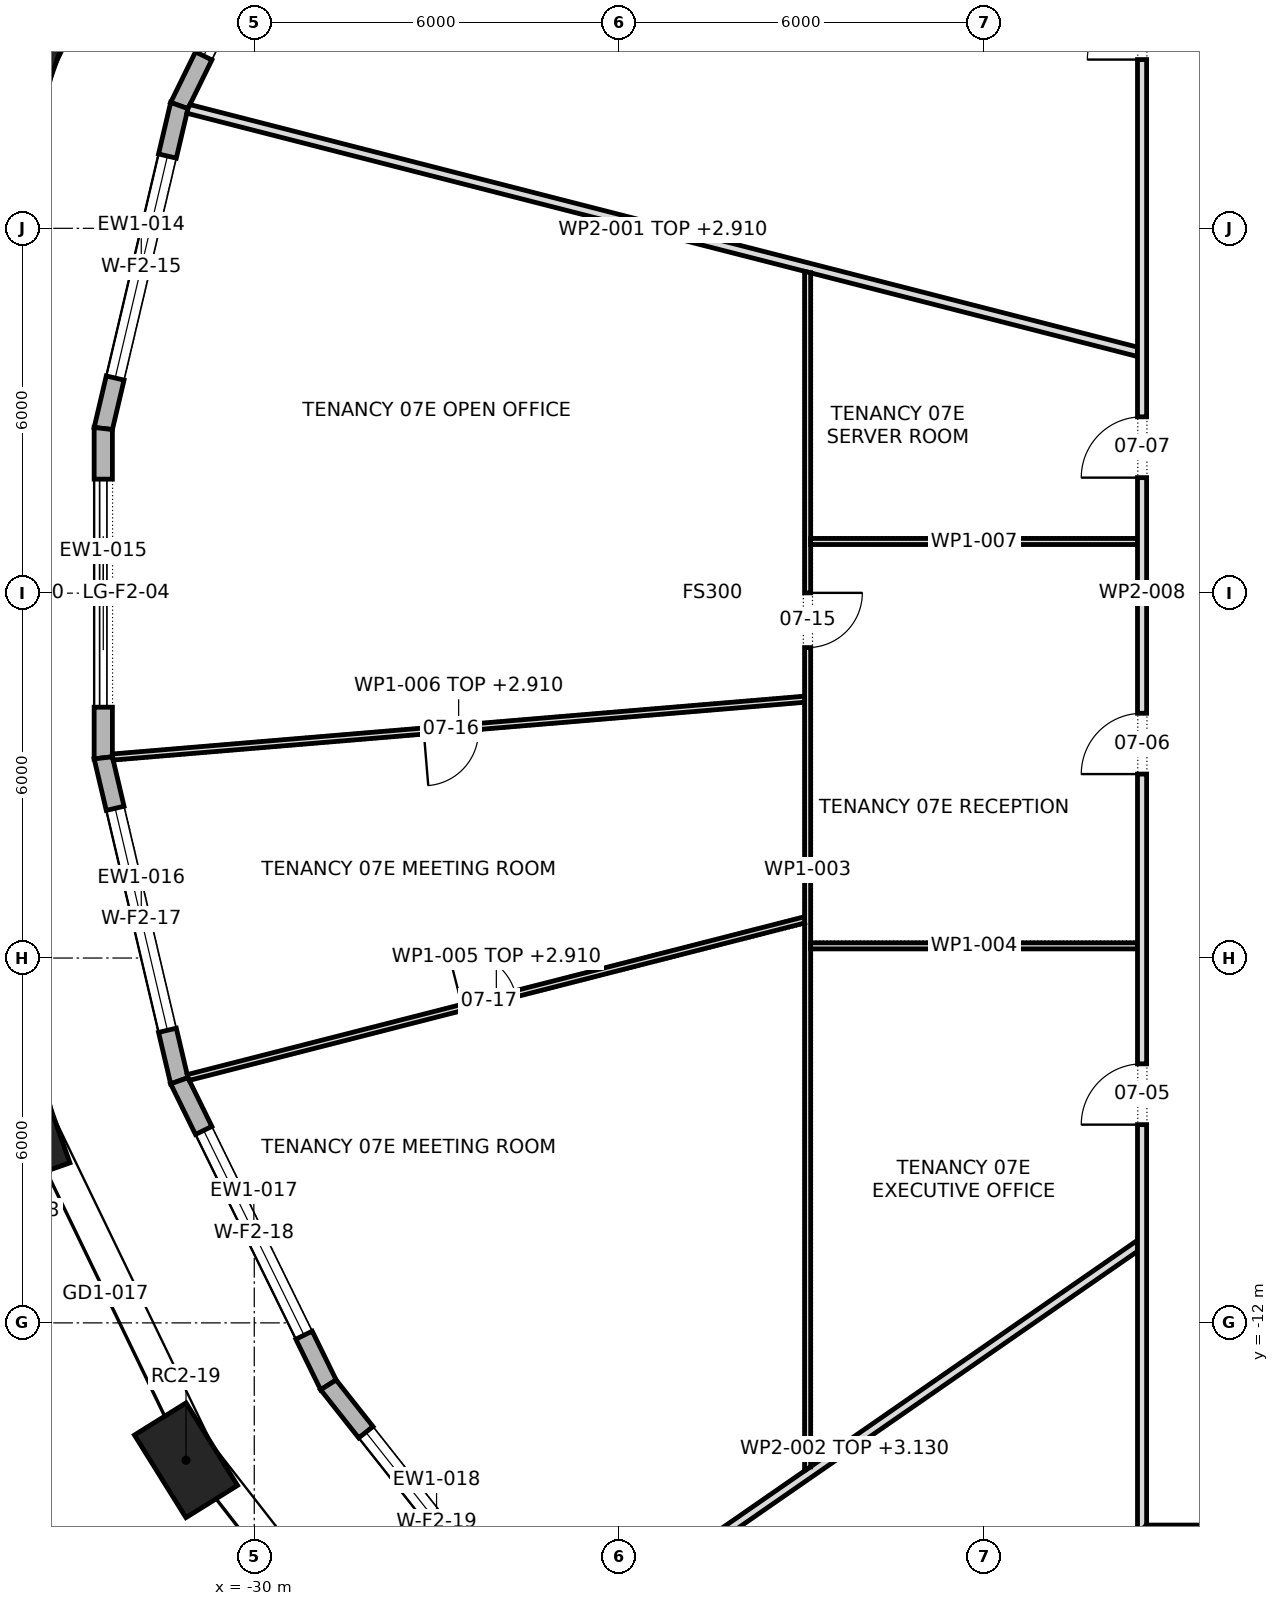
"""IFC4 building model, lengths in metres.
Left out: names, types, materials, properties, quantities, classifications, styles, units other than length and angle.
Written with IfcOpenShell. Run it as: python <this file> out.ifc"""

import sys

from ifc_helpers import new_model, si_unit, direction, frame, frame_2d, origin, origin_2d, place, context, subcontext, project, spatial, polyline, rectangle, outline, extrude, element, fill, save


model = new_model("IFC4")
c1 = context("Model", 3, precision=1e-05, world=origin(), true_north=direction((0.0, 1.0)))
c2 = subcontext(c1, "Body", "Model", "MODEL_VIEW")
j1 = project(units=[si_unit("LENGTHUNIT", "METRE"), si_unit("PLANEANGLEUNIT", "RADIAN")], contexts=[c1])
p1 = place(None, origin())
s1 = spatial("IfcSite", under=j1, at=p1, CompositionType="ELEMENT")
p2 = place(p1, origin())
s2 = spatial("IfcBuilding", under=s1, at=p2, CompositionType="ELEMENT")
p3 = place(p2, frame((0.0, 0.0, 104.5)))
s3 = spatial("IfcBuildingStorey", under=s2, at=p3, CompositionType="ELEMENT", Elevation=104.5)
for number, where, z_axis, x_axis in (
    (1, (-33.77, 8.781, 0.0), (0.0, 0.0, 1.0), (-0.334, -0.943, 0.0)),
    (2, (-33.77, -8.781, 0.0), (0.0, 0.0, 1.0), (0.334, -0.943, 0.0)),
    (3, (-31.123, -14.259, 0.0), (0.0, 0.0, 1.0), (0.529, -0.849, 0.0)),
):
    element("IfcColumn", number, at=place(p3, frame(where, z_axis=z_axis, x_axis=x_axis)), inside=s3, PredefinedType="COLUMN", context=c2, shape_type="SweptSolid", body=[
        extrude(rectangle(XDim=1.6, YDim=1.0, at=origin_2d()), origin(), (0.0, 0.0, 1.0), 4.2),
    ])
p4 = place(p3, frame((-28.781, 13.019, 0.0), z_axis=(0.0, 0.0, 1.0), x_axis=(-0.440238988749, -0.897880633929, 0.0)))
e4 = element("IfcWall", 4, at=p4, inside=s3, PredefinedType="STANDARD", context=c2, shape_type="SweptSolid", body=[
    extrude(outline(polyline([(-0.016, -0.15), (5.586, -0.15), (5.553, 0.15), (0.016, 0.15), (-0.016, -0.15)])), origin(), (0.0, 0.0, 1.0), 3.9),
])
p5 = place(p4, frame((0.91, 0.0, 0.6)))
e5 = element("IfcOpeningElement", 5, at=p5, cuts=e4, PredefinedType="OPENING", context=c2, shape_type="SweptSolid", body=[
    extrude(rectangle(XDim=3.75, YDim=2.85, at=frame_2d((1.875, 1.425))), frame((0.0, 0.162, 0.0), z_axis=(0.0, -1.0, 0.0), x_axis=(1.0, 0.0, 0.0)), (0.0, 0.0, 1.0), 0.324),
])
p6 = place(p3, frame((-31.233, 8.019, 0.0), z_axis=(0.0, 0.0, 1.0), x_axis=(-0.229193964616, -0.973380771632, 0.0)))
e6 = element("IfcWall", 6, at=p6, inside=s3, PredefinedType="STANDARD", context=c2, shape_type="SweptSolid", body=[
    extrude(outline(polyline([(-0.017, -0.15), (5.473, -0.15), (5.439, 0.15), (0.017, 0.15), (-0.017, -0.15)])), origin(), (0.0, 0.0, 1.0), 3.9),
])
p7 = place(p6, frame((0.853, 0.0, 0.6)))
e7 = element("IfcOpeningElement", 7, at=p7, cuts=e6, PredefinedType="OPENING", context=c2, shape_type="SweptSolid", body=[
    extrude(rectangle(XDim=3.75, YDim=2.85, at=frame_2d((1.875, 1.425))), frame((0.0, 0.162, 0.0), z_axis=(0.0, -1.0, 0.0), x_axis=(1.0, 0.0, 0.0)), (0.0, 0.0, 1.0), 0.324),
])
p8 = place(p3, frame((-32.483, 2.708, 0.0), z_axis=(0.0, 0.0, 1.0), x_axis=(0.0, -1.0, 0.0)))
e8 = element("IfcWall", 8, at=p8, inside=s3, PredefinedType="STANDARD", context=c2, shape_type="SweptSolid", body=[
    extrude(outline(polyline([(-0.017, -0.15), (5.433, -0.15), (5.398, 0.15), (0.017, 0.15), (-0.017, -0.15)])), origin(), (0.0, 0.0, 1.0), 3.9),
])
p9 = place(p8, frame((0.833, 0.0, 0.0)))
e9 = element("IfcOpeningElement", 9, at=p9, cuts=e8, PredefinedType="OPENING", context=c2, shape_type="SweptSolid", body=[
    extrude(rectangle(XDim=3.75, YDim=3.45, at=frame_2d((1.875, 1.725))), frame((0.0, 0.162, 0.0), z_axis=(0.0, -1.0, 0.0), x_axis=(1.0, 0.0, 0.0)), (0.0, 0.0, 1.0), 0.324),
])
p10 = place(p3, frame((-32.483, -2.708, 0.0), z_axis=(0.0, 0.0, 1.0), x_axis=(0.229193964616, -0.973380771632, 0.0)))
e10 = element("IfcWall", 10, at=p10, inside=s3, PredefinedType="STANDARD", context=c2, shape_type="SweptSolid", body=[
    extrude(outline(polyline([(-0.017, -0.15), (5.473, -0.15), (5.439, 0.15), (0.017, 0.15), (-0.017, -0.15)])), origin(), (0.0, 0.0, 1.0), 3.9),
])
p11 = place(p10, frame((0.853, 0.0, 0.6)))
e11 = element("IfcOpeningElement", 11, at=p11, cuts=e10, PredefinedType="OPENING", context=c2, shape_type="SweptSolid", body=[
    extrude(rectangle(XDim=3.75, YDim=2.85, at=frame_2d((1.875, 1.425))), frame((0.0, 0.162, 0.0), z_axis=(0.0, -1.0, 0.0), x_axis=(1.0, 0.0, 0.0)), (0.0, 0.0, 1.0), 0.324),
])
p12 = place(p3, frame((-31.233, -8.019, 0.0), z_axis=(0.0, 0.0, 1.0), x_axis=(0.440238988749, -0.897880633929, 0.0)))
e12 = element("IfcWall", 12, at=p12, inside=s3, PredefinedType="STANDARD", context=c2, shape_type="SweptSolid", body=[
    extrude(outline(polyline([(-0.017, -0.15), (5.586, -0.15), (5.553, 0.15), (0.017, 0.15), (-0.017, -0.15)])), origin(), (0.0, 0.0, 1.0), 3.9),
])
p13 = place(p12, frame((0.91, 0.0, 0.6)))
e13 = element("IfcOpeningElement", 13, at=p13, cuts=e12, PredefinedType="OPENING", context=c2, shape_type="SweptSolid", body=[
    extrude(rectangle(XDim=3.75, YDim=2.85, at=frame_2d((1.875, 1.425))), frame((0.0, 0.162, 0.0), z_axis=(0.0, -1.0, 0.0), x_axis=(1.0, 0.0, 0.0)), (0.0, 0.0, 1.0), 0.324),
])
p14 = place(p3, frame((-28.781, -13.019, 0.0), z_axis=(0.0, 0.0, 1.0), x_axis=(0.620329992039, -0.784340934146, 0.0)))
e14 = element("IfcWall", 14, at=p14, inside=s3, PredefinedType="STANDARD", context=c2, shape_type="SweptSolid", body=[
    extrude(outline(polyline([(-0.016, -0.15), (5.75, -0.15), (5.72, 0.15), (0.016, 0.15), (-0.016, -0.15)])), origin(), (0.0, 0.0, 1.0), 3.9),
])
p15 = place(p14, frame((0.993, 0.0, 0.6)))
e15 = element("IfcOpeningElement", 15, at=p15, cuts=e14, PredefinedType="OPENING", context=c2, shape_type="SweptSolid", body=[
    extrude(rectangle(XDim=3.75, YDim=2.85, at=frame_2d((1.875, 1.425))), frame((0.0, 0.162, 0.0), z_axis=(0.0, -1.0, 0.0), x_axis=(1.0, 0.0, 0.0)), (0.0, 0.0, 1.0), 0.324),
])
p16 = place(p3, frame((-31.09, 7.966, 0.0), z_axis=(0.0, 0.0, 1.0), x_axis=(0.968771016809, -0.247957086995, 0.0)))
e16 = element("IfcWall", 16, at=p16, inside=s3, PredefinedType="PARTITIONING", context=c2, shape_type="SweptSolid", body=[
    extrude(outline(polyline([(16.137, -0.075), (16.137, -0.073), (16.099, 0.075), (14.312, 0.075), (12.524, 0.075), (10.737, 0.075), (8.95, 0.075), (7.163, 0.075), (5.375, 0.075), (3.588, 0.075), (1.801, 0.075), (0.014, 0.075), (0.0, 0.008), (0.0, -0.067), (0.0, -0.075), (1.793, -0.075), (3.586, -0.075), (5.379, -0.075), (7.172, -0.075), (8.965, -0.075), (10.758, -0.075), (12.551, -0.075), (14.344, -0.075), (16.137, -0.075)])), origin(), (0.0, 0.0, 1.0), 2.91),
])
p17 = place(p3, frame((-25.12, -17.414, 0.0), z_axis=(0.0, 0.0, 1.0), x_axis=(0.822008683907, 0.569474954306, 0.0)))
e17 = element("IfcWall", 17, at=p17, inside=s3, PredefinedType="PARTITIONING", context=c2, shape_type="SweptSolid", body=[
    extrude(outline(polyline([(0.024, -0.075), (1.967, -0.075), (3.91, -0.075), (5.853, -0.075), (7.796, -0.075), (9.739, -0.075), (11.681, -0.075), (11.734, 0.002), (11.734, 0.002), (11.785, 0.074), (11.785, 0.075), (10.15, 0.075), (8.516, 0.075), (6.881, 0.075), (5.246, 0.075), (5.245, 0.072), (5.241, 0.075), (3.494, 0.075), (1.747, 0.075), (0.0, 0.075), (0.0, 0.07), (0.005, -0.002), (0.024, -0.075)])), origin(), (0.0, 0.0, 1.0), 3.13),
])
p18 = place(p3, frame((-20.9, -14.434, 0.0), z_axis=(0.0, 0.0, 1.0), x_axis=(0.0, 1.0, 0.0)))
e18 = element("IfcWall", 18, at=p18, inside=s3, PredefinedType="PARTITIONING", context=c2, shape_type="SweptSolid", body=[
    extrude(outline(polyline([(0.069, -0.05), (1.772, -0.05), (3.475, -0.05), (5.178, -0.05), (6.881, -0.05), (8.583, -0.05), (8.583, -0.05), (8.684, -0.05), (8.684, -0.05), (10.321, -0.05), (11.958, -0.05), (13.596, -0.05), (15.234, -0.05), (15.234, -0.05), (15.333, -0.05), (15.333, -0.05), (16.789, -0.05), (18.245, -0.05), (19.701, -0.05), (19.727, 0.05), (19.727, 0.05), (17.942, 0.05), (16.156, 0.05), (14.372, 0.05), (12.587, 0.05), (10.802, 0.05), (9.017, 0.05), (9.01, 0.048), (9.009, 0.05), (7.208, 0.05), (5.406, 0.05), (3.604, 0.05), (1.802, 0.05), (0.0, 0.05), (0.069, -0.05)])), origin(), (0.0, 0.0, 1.0), 3.9),
])
p19 = place(p18, frame((13.539, 0.0, 0.0)))
e19 = element("IfcOpeningElement", 19, at=p19, cuts=e18, PredefinedType="OPENING", context=c2, shape_type="SweptSolid", body=[
    extrude(rectangle(XDim=0.9, YDim=2.1, at=frame_2d((0.45, 1.05))), frame((0.0, 0.062, 0.0), z_axis=(0.0, -1.0, 0.0), x_axis=(1.0, 0.0, 0.0)), (0.0, 0.0, 1.0), 0.124),
])
p20 = place(p3, frame((-20.85, -5.8, 0.0), z_axis=(0.0, 0.0, 1.0), x_axis=(1.0, 0.0, 0.0)))
e20 = element("IfcWall", 20, at=p20, inside=s3, PredefinedType="PARTITIONING", context=c2, shape_type="SweptSolid", body=[
    extrude(rectangle(XDim=5.375, YDim=0.1, at=frame_2d((2.688, 0.0))), origin(), (0.0, 0.0, 1.0), 3.9),
])
p21 = place(p3, frame((-20.938, -5.37, 0.0), z_axis=(0.0, 0.0, 1.0), x_axis=(-0.968822345516, -0.247756458702, 0.0)))
e21 = element("IfcWall", 21, at=p21, inside=s3, PredefinedType="PARTITIONING", context=c2, shape_type="SweptSolid", body=[
    extrude(outline(polyline([(10.479, -0.05), (10.479, 0.007), (10.47, 0.05), (8.729, 0.05), (6.988, 0.05), (5.248, 0.05), (3.507, 0.05), (1.766, 0.05), (0.025, 0.05), (0.0, -0.05), (0.0, -0.05), (1.747, -0.05), (3.493, -0.05), (5.239, -0.05), (6.986, -0.05), (8.732, -0.05), (10.479, -0.05)])), origin(), (0.0, 0.0, 1.0), 2.91),
])
p22 = place(p21, frame((4.92, 0.0, 0.0)))
e22 = element("IfcOpeningElement", 22, at=p22, cuts=e21, PredefinedType="OPENING", context=c2, shape_type="SweptSolid", body=[
    extrude(rectangle(XDim=0.9, YDim=2.1, at=frame_2d((0.45, 1.05))), frame((0.0, 0.062, 0.0), z_axis=(0.0, -1.0, 0.0), x_axis=(1.0, 0.0, 0.0)), (0.0, 0.0, 1.0), 0.124),
])
p23 = place(p3, frame((-20.946, -1.744, 0.0), z_axis=(0.0, 0.0, 1.0), x_axis=(-0.996528638139, -0.083250665871, 0.0)))
e23 = element("IfcWall", 23, at=p23, inside=s3, PredefinedType="PARTITIONING", context=c2, shape_type="SweptSolid", body=[
    extrude(outline(polyline([(11.422, -0.05), (11.422, 0.023), (11.418, 0.05), (9.517, 0.05), (7.615, 0.05), (5.713, 0.05), (3.812, 0.05), (1.91, 0.05), (0.008, 0.05), (0.0, -0.05), (1.904, -0.05), (3.807, -0.05), (5.711, -0.05), (7.615, -0.05), (9.519, -0.05), (11.422, -0.05)])), origin(), (0.0, 0.0, 1.0), 2.91),
])
p24 = place(p23, frame((5.389, 0.0, 0.0)))
e24 = element("IfcOpeningElement", 24, at=p24, cuts=e23, PredefinedType="OPENING", context=c2, shape_type="SweptSolid", body=[
    extrude(rectangle(XDim=0.9, YDim=2.1, at=frame_2d((0.45, 1.05))), frame((0.0, 0.062, 0.0), z_axis=(0.0, -1.0, 0.0), x_axis=(1.0, 0.0, 0.0)), (0.0, 0.0, 1.0), 0.124),
])
p25 = place(p3, frame((-20.85, 0.85, 0.0), z_axis=(0.0, 0.0, 1.0), x_axis=(1.0, 0.0, 0.0)))
e25 = element("IfcWall", 25, at=p25, inside=s3, PredefinedType="PARTITIONING", context=c2, shape_type="SweptSolid", body=[
    extrude(rectangle(XDim=5.375, YDim=0.1, at=frame_2d((2.688, 0.0))), origin(), (0.0, 0.0, 1.0), 3.9),
])
p26 = place(p3, frame((-15.4, -15.475, 0.0), z_axis=(0.0, 0.0, 1.0), x_axis=(0.0, 1.0, 0.0)))
e26 = element("IfcWall", 26, at=p26, inside=s3, PredefinedType="PARTITIONING", context=c2, shape_type="SweptSolid", body=[
    extrude(outline(polyline([(0.15, -0.075), (2.066, -0.075), (3.981, -0.075), (5.897, -0.075), (7.812, -0.075), (9.728, -0.075), (11.644, -0.075), (13.56, -0.075), (15.475, -0.075), (17.391, -0.075), (19.306, -0.075), (21.222, -0.075), (23.138, -0.075), (25.053, -0.075), (26.969, -0.075), (28.885, -0.075), (30.8, -0.075), (30.95, 0.075), (29.016, 0.075), (27.081, 0.075), (25.147, 0.075), (23.212, 0.075), (21.278, 0.075), (19.344, 0.075), (17.409, 0.075), (15.475, 0.075), (13.541, 0.075), (11.606, 0.075), (9.672, 0.075), (7.738, 0.075), (5.803, 0.075), (3.869, 0.075), (1.935, 0.075), (0.0, 0.075), (0.15, -0.075)])), origin(), (0.0, 0.0, 1.0), 3.9),
])
p27 = place(p26, frame((24.25, 0.0, 0.0)))
e27 = element("IfcOpeningElement", 27, at=p27, cuts=e26, PredefinedType="OPENING", context=c2, shape_type="SweptSolid", body=[
    extrude(rectangle(XDim=1.8, YDim=2.1, at=frame_2d((0.9, 1.05))), frame((0.0, 0.087, 0.0), z_axis=(0.0, -1.0, 0.0), x_axis=(1.0, 0.0, 0.0)), (0.0, 0.0, 1.0), 0.174),
])
p28 = place(p26, frame((6.735, 0.0, 0.0)))
e28 = element("IfcOpeningElement", 28, at=p28, cuts=e26, PredefinedType="OPENING", context=c2, shape_type="SweptSolid", body=[
    extrude(rectangle(XDim=1.0, YDim=2.1, at=frame_2d((0.5, 1.05))), frame((0.0, 0.087, 0.0), z_axis=(0.0, -1.0, 0.0), x_axis=(1.0, 0.0, 0.0)), (0.0, 0.0, 1.0), 0.174),
])
p29 = place(p26, frame((12.5, 0.0, 0.0)))
e29 = element("IfcOpeningElement", 29, at=p29, cuts=e26, PredefinedType="OPENING", context=c2, shape_type="SweptSolid", body=[
    extrude(rectangle(XDim=1.0, YDim=2.1, at=frame_2d((0.5, 1.05))), frame((0.0, 0.087, 0.0), z_axis=(0.0, -1.0, 0.0), x_axis=(1.0, 0.0, 0.0)), (0.0, 0.0, 1.0), 0.174),
])
p30 = place(p26, frame((17.375, 0.0, 0.0)))
e30 = element("IfcOpeningElement", 30, at=p30, cuts=e26, PredefinedType="OPENING", context=c2, shape_type="SweptSolid", body=[
    extrude(rectangle(XDim=1.0, YDim=2.1, at=frame_2d((0.5, 1.05))), frame((0.0, 0.087, 0.0), z_axis=(0.0, -1.0, 0.0), x_axis=(1.0, 0.0, 0.0)), (0.0, 0.0, 1.0), 0.174),
])
p31 = place(p3, frame((-15.475, -15.4, 0.0), z_axis=(0.0, 0.0, 1.0), x_axis=(1.0, 0.0, 0.0)))
e31 = element("IfcWall", 31, at=p31, inside=s3, PredefinedType="PARTITIONING", context=c2, shape_type="SweptSolid", body=[
    extrude(outline(polyline([(0.0, -0.075), (1.935, -0.075), (3.869, -0.075), (5.803, -0.075), (7.738, -0.075), (9.672, -0.075), (11.606, -0.075), (13.541, -0.075), (15.475, -0.075), (17.409, -0.075), (19.344, -0.075), (21.278, -0.075), (23.212, -0.075), (25.147, -0.075), (27.081, -0.075), (29.016, -0.075), (30.95, -0.075), (30.8, 0.075), (28.885, 0.075), (26.969, 0.075), (25.053, 0.075), (23.138, 0.075), (21.222, 0.075), (19.306, 0.075), (17.391, 0.075), (15.475, 0.075), (13.56, 0.075), (11.644, 0.075), (9.728, 0.075), (7.812, 0.075), (5.897, 0.075), (3.981, 0.075), (2.066, 0.075), (0.15, 0.075), (0.0, -0.075)])), origin(), (0.0, 0.0, 1.0), 3.9),
])
p32 = place(p31, frame((2.405, 0.0, 0.0)))
e32 = element("IfcOpeningElement", 32, at=p32, cuts=e31, PredefinedType="OPENING", context=c2, shape_type="SweptSolid", body=[
    extrude(rectangle(XDim=1.0, YDim=2.1, at=frame_2d((0.5, 1.05))), frame((0.0, 0.087, 0.0), z_axis=(0.0, -1.0, 0.0), x_axis=(1.0, 0.0, 0.0)), (0.0, 0.0, 1.0), 0.174),
])
p33 = place(p31, frame((10.605, 0.0, 0.0)))
e33 = element("IfcOpeningElement", 33, at=p33, cuts=e31, PredefinedType="OPENING", context=c2, shape_type="SweptSolid", body=[
    extrude(rectangle(XDim=1.8, YDim=2.1, at=frame_2d((0.9, 1.05))), frame((0.0, 0.087, 0.0), z_axis=(0.0, -1.0, 0.0), x_axis=(1.0, 0.0, 0.0)), (0.0, 0.0, 1.0), 0.174),
])
p34 = place(p31, frame((22.955, 0.0, 0.0)))
e34 = element("IfcOpeningElement", 34, at=p34, cuts=e31, PredefinedType="OPENING", context=c2, shape_type="SweptSolid", body=[
    extrude(rectangle(XDim=1.8, YDim=2.1, at=frame_2d((0.9, 1.05))), frame((0.0, 0.087, 0.0), z_axis=(0.0, -1.0, 0.0), x_axis=(1.0, 0.0, 0.0)), (0.0, 0.0, 1.0), 0.174),
])
p35 = place(p5, origin())
e35 = element("IfcWindow", 35, at=p35, inside=s3, PartitioningType="TRIPLE_PANEL_VERTICAL", PredefinedType="WINDOW", context=c2, shape_type="SweptSolid", body=[
    extrude(rectangle(XDim=3.75, YDim=2.85, at=frame_2d((1.875, 1.425))), frame((0.0, 0.03, 0.0), z_axis=(0.0, -1.0, 0.0), x_axis=(1.0, 0.0, 0.0)), (0.0, 0.0, 1.0), 0.06),
])
fill(e5, e35)
p36 = place(p7, origin())
e36 = element("IfcWindow", 36, at=p36, inside=s3, PartitioningType="TRIPLE_PANEL_VERTICAL", PredefinedType="WINDOW", context=c2, shape_type="SweptSolid", body=[
    extrude(rectangle(XDim=3.75, YDim=2.85, at=frame_2d((1.875, 1.425))), frame((0.0, 0.03, 0.0), z_axis=(0.0, -1.0, 0.0), x_axis=(1.0, 0.0, 0.0)), (0.0, 0.0, 1.0), 0.06),
])
fill(e7, e36)
p37 = place(p9, origin())
e37 = element("IfcDoor", 37, at=p37, inside=s3, OperationType="DOUBLE_DOOR_SLIDING", PredefinedType="DOOR", context=c2, shape_type="SweptSolid", body=[
    extrude(rectangle(XDim=3.75, YDim=3.45, at=frame_2d((1.875, 1.725))), frame((0.0, 0.025, 0.0), z_axis=(0.0, -1.0, 0.0), x_axis=(1.0, 0.0, 0.0)), (0.0, 0.0, 1.0), 0.05),
])
fill(e9, e37)
p38 = place(p11, origin())
e38 = element("IfcWindow", 38, at=p38, inside=s3, PartitioningType="TRIPLE_PANEL_VERTICAL", PredefinedType="WINDOW", context=c2, shape_type="SweptSolid", body=[
    extrude(rectangle(XDim=3.75, YDim=2.85, at=frame_2d((1.875, 1.425))), frame((0.0, 0.03, 0.0), z_axis=(0.0, -1.0, 0.0), x_axis=(1.0, 0.0, 0.0)), (0.0, 0.0, 1.0), 0.06),
])
fill(e11, e38)
p39 = place(p13, origin())
e39 = element("IfcWindow", 39, at=p39, inside=s3, PartitioningType="TRIPLE_PANEL_VERTICAL", PredefinedType="WINDOW", context=c2, shape_type="SweptSolid", body=[
    extrude(rectangle(XDim=3.75, YDim=2.85, at=frame_2d((1.875, 1.425))), frame((0.0, 0.03, 0.0), z_axis=(0.0, -1.0, 0.0), x_axis=(1.0, 0.0, 0.0)), (0.0, 0.0, 1.0), 0.06),
])
fill(e13, e39)
p40 = place(p15, origin())
e40 = element("IfcWindow", 40, at=p40, inside=s3, PartitioningType="TRIPLE_PANEL_VERTICAL", PredefinedType="WINDOW", context=c2, shape_type="SweptSolid", body=[
    extrude(rectangle(XDim=3.75, YDim=2.85, at=frame_2d((1.875, 1.425))), frame((0.0, 0.03, 0.0), z_axis=(0.0, -1.0, 0.0), x_axis=(1.0, 0.0, 0.0)), (0.0, 0.0, 1.0), 0.06),
])
fill(e15, e40)
p41 = place(p27, origin())
e41 = element("IfcDoor", 41, at=p41, inside=s3, OperationType="DOUBLE_DOOR_SINGLE_SWING", PredefinedType="DOOR", context=c2, shape_type="SweptSolid", body=[
    extrude(rectangle(XDim=1.8, YDim=2.1, at=frame_2d((0.9, 1.05))), frame((0.0, 0.025, 0.0), z_axis=(0.0, -1.0, 0.0), x_axis=(1.0, 0.0, 0.0)), (0.0, 0.0, 1.0), 0.05),
])
fill(e27, e41)
p42 = place(p28, origin())
e42 = element("IfcDoor", 42, at=p42, inside=s3, OperationType="SINGLE_SWING_RIGHT", PredefinedType="DOOR", context=c2, shape_type="SweptSolid", body=[
    extrude(rectangle(XDim=1.0, YDim=2.1, at=frame_2d((0.5, 1.05))), frame((0.0, 0.025, 0.0), z_axis=(0.0, -1.0, 0.0), x_axis=(1.0, 0.0, 0.0)), (0.0, 0.0, 1.0), 0.05),
])
fill(e28, e42)
p43 = place(p29, origin())
e43 = element("IfcDoor", 43, at=p43, inside=s3, OperationType="SINGLE_SWING_RIGHT", PredefinedType="DOOR", context=c2, shape_type="SweptSolid", body=[
    extrude(rectangle(XDim=1.0, YDim=2.1, at=frame_2d((0.5, 1.05))), frame((0.0, 0.025, 0.0), z_axis=(0.0, -1.0, 0.0), x_axis=(1.0, 0.0, 0.0)), (0.0, 0.0, 1.0), 0.05),
])
fill(e29, e43)
p44 = place(p30, origin())
e44 = element("IfcDoor", 44, at=p44, inside=s3, OperationType="SINGLE_SWING_RIGHT", PredefinedType="DOOR", context=c2, shape_type="SweptSolid", body=[
    extrude(rectangle(XDim=1.0, YDim=2.1, at=frame_2d((0.5, 1.05))), frame((0.0, 0.025, 0.0), z_axis=(0.0, -1.0, 0.0), x_axis=(1.0, 0.0, 0.0)), (0.0, 0.0, 1.0), 0.05),
])
fill(e30, e44)
p45 = place(p19, frame((0.9, 0.0, 0.0), z_axis=(0.0, 0.0, 1.0), x_axis=(-1.0, 0.0, 0.0)))
e45 = element("IfcDoor", 45, at=p45, inside=s3, OperationType="SINGLE_SWING_RIGHT", PredefinedType="DOOR", context=c2, shape_type="SweptSolid", body=[
    extrude(rectangle(XDim=0.9, YDim=2.1, at=frame_2d((0.45, 1.05))), frame((0.0, 0.025, 0.0), z_axis=(0.0, -1.0, 0.0), x_axis=(1.0, 0.0, 0.0)), (0.0, 0.0, 1.0), 0.05),
])
fill(e19, e45)
p46 = place(p24, origin())
e46 = element("IfcDoor", 46, at=p46, inside=s3, OperationType="SINGLE_SWING_LEFT", PredefinedType="DOOR", context=c2, shape_type="SweptSolid", body=[
    extrude(rectangle(XDim=0.9, YDim=2.1, at=frame_2d((0.45, 1.05))), frame((0.0, 0.025, 0.0), z_axis=(0.0, -1.0, 0.0), x_axis=(1.0, 0.0, 0.0)), (0.0, 0.0, 1.0), 0.05),
])
fill(e24, e46)
p47 = place(p22, frame((0.9, 0.0, 0.0), z_axis=(0.0, 0.0, 1.0), x_axis=(-1.0, 0.0, 0.0)))
e47 = element("IfcDoor", 47, at=p47, inside=s3, OperationType="SINGLE_SWING_RIGHT", PredefinedType="DOOR", context=c2, shape_type="SweptSolid", body=[
    extrude(rectangle(XDim=0.9, YDim=2.1, at=frame_2d((0.45, 1.05))), frame((0.0, 0.025, 0.0), z_axis=(0.0, -1.0, 0.0), x_axis=(1.0, 0.0, 0.0)), (0.0, 0.0, 1.0), 0.05),
])
fill(e22, e47)
save(model, sys.argv[1])
